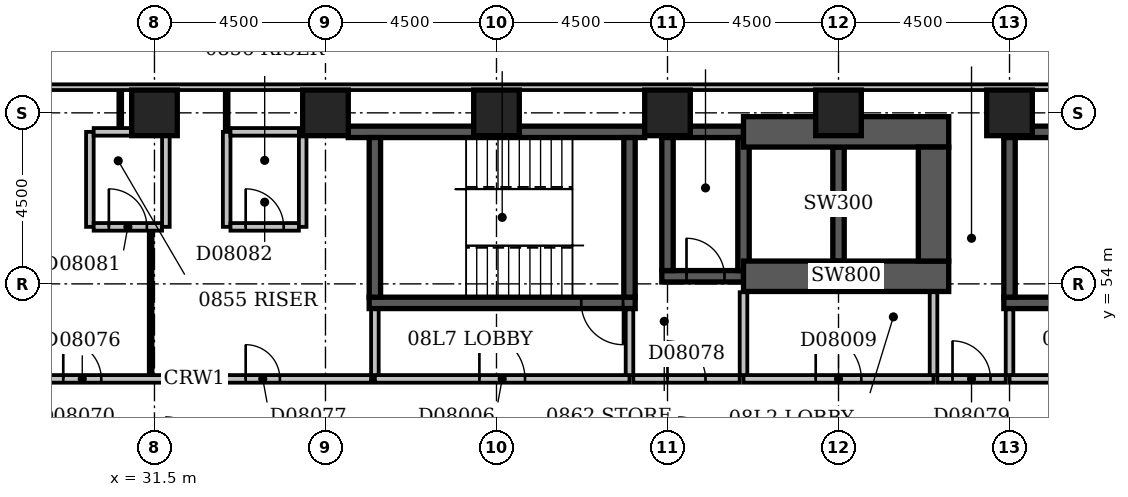
"""IFC4 building model, lengths in metres.
Left out: names, types, materials, properties, quantities, classifications, styles, units other than length and angle.
Written with IfcOpenShell. Run it as: python <this file> out.ifc"""

import sys

from ifc_helpers import new_model, si_unit, direction, frame, frame_2d, origin, origin_2d, place, context, subcontext, project, spatial, rectangle, extrude, element, fill, save


model = new_model("IFC4")
c1 = context("Model", 3, precision=1e-05, world=origin(), true_north=direction((0.0, 1.0)))
c2 = subcontext(c1, "Body", "Model", "MODEL_VIEW")
j1 = project(units=[si_unit("LENGTHUNIT", "METRE"), si_unit("PLANEANGLEUNIT", "RADIAN")], contexts=[c1])
p1 = place(None, origin())
s1 = spatial("IfcSite", under=j1, at=p1, CompositionType="ELEMENT")
p2 = place(p1, origin())
s2 = spatial("IfcBuilding", under=s1, at=p2, CompositionType="ELEMENT")
p3 = place(p2, frame((0.0, 0.0, 39.8)))
s3 = spatial("IfcBuildingStorey", under=s2, at=p3, CompositionType="ELEMENT", Elevation=39.8)
p4 = place(p3, frame((36.6, 58.0, -0.3), z_axis=(0.0, 0.0, 1.0), x_axis=(1.0, 0.0, 0.0)))
e1 = element("IfcWall", 1, at=p4, inside=s3, PredefinedType="SHEAR", context=c2, shape_type="SweptSolid", body=[
    extrude(rectangle(XDim=7.8, YDim=0.3, at=frame_2d((3.9, 0.0))), origin(), (0.0, 0.0, 1.0), 3.6),
])
p5 = place(p3, frame((37.15, 53.5, -0.3), z_axis=(0.0, 0.0, 1.0), x_axis=(1.0, 0.0, 0.0)))
e2 = element("IfcWall", 2, at=p5, inside=s3, PredefinedType="SHEAR", context=c2, shape_type="SweptSolid", body=[
    extrude(rectangle(XDim=7.0, YDim=0.3, at=frame_2d((3.5, 0.0))), origin(), (0.0, 0.0, 1.0), 3.6),
])
p6 = place(p5, frame((5.58, 0.0, 0.3)))
e3 = element("IfcOpeningElement", 3, at=p6, cuts=e2, PredefinedType="OPENING", context=c2, shape_type="SweptSolid", body=[
    extrude(rectangle(XDim=1.1, YDim=2.1, at=frame_2d((0.55, 1.05))), frame((0.0, 0.162, 0.0), z_axis=(0.0, -1.0, 0.0), x_axis=(1.0, 0.0, 0.0)), (0.0, 0.0, 1.0), 0.324),
])
for number, where, z_axis, x_axis in (
    (4, (37.3, 53.65, -0.3), (0.0, 0.0, 1.0), (0.0, 1.0, 0.0)),
    (5, (44.0, 53.65, -0.3), (0.0, 0.0, 1.0), (0.0, 1.0, 0.0)),
):
    element("IfcWall", number, at=place(p3, frame(where, z_axis=z_axis, x_axis=x_axis)), inside=s3, PredefinedType="SHEAR", context=c2, shape_type="SweptSolid", body=[
        extrude(rectangle(XDim=4.2, YDim=0.3, at=frame_2d((2.1, 0.0))), origin(), (0.0, 0.0, 1.0), 3.6),
    ])
p7 = place(p3, frame((44.85, 54.2, -0.3), z_axis=(0.0, 0.0, 1.0), x_axis=(1.0, 0.0, 0.0)))
e6 = element("IfcWall", 6, at=p7, inside=s3, PredefinedType="SHEAR", context=c2, shape_type="SweptSolid", body=[
    extrude(rectangle(XDim=2.15, YDim=0.3, at=frame_2d((1.075, 0.0))), origin(), (0.0, 0.0, 1.0), 3.6),
])
p8 = place(p7, frame((0.65, 0.0, 0.3)))
e7 = element("IfcOpeningElement", 7, at=p8, cuts=e6, PredefinedType="OPENING", context=c2, shape_type="SweptSolid", body=[
    extrude(rectangle(XDim=1.0, YDim=2.1, at=frame_2d((0.5, 1.05))), frame((0.0, 0.162, 0.0), z_axis=(0.0, -1.0, 0.0), x_axis=(1.0, 0.0, 0.0)), (0.0, 0.0, 1.0), 0.324),
])
p9 = place(p3, frame((44.85, 58.0, -0.3), z_axis=(0.0, 0.0, 1.0), x_axis=(1.0, 0.0, 0.0)))
e8 = element("IfcWall", 8, at=p9, inside=s3, PredefinedType="SHEAR", context=c2, shape_type="SweptSolid", body=[
    extrude(rectangle(XDim=2.15, YDim=0.3, at=frame_2d((1.075, 0.0))), origin(), (0.0, 0.0, 1.0), 3.6),
])
p10 = place(p3, frame((45.0, 54.35, -0.3), z_axis=(0.0, 0.0, 1.0), x_axis=(0.0, 1.0, 0.0)))
e9 = element("IfcWall", 9, at=p10, inside=s3, PredefinedType="SHEAR", context=c2, shape_type="SweptSolid", body=[
    extrude(rectangle(XDim=3.5, YDim=0.3, at=frame_2d((1.75, 0.0))), origin(), (0.0, 0.0, 1.0), 3.6),
])
p11 = place(p3, frame((47.0, 54.2, -0.3), z_axis=(0.0, 0.0, 1.0), x_axis=(1.0, 0.0, 0.0)))
e10 = element("IfcWall", 10, at=p11, inside=s3, PredefinedType="SHEAR", context=c2, shape_type="SweptSolid", body=[
    extrude(rectangle(XDim=5.4, YDim=0.8, at=frame_2d((2.7, 0.0))), origin(), (0.0, 0.0, 1.0), 3.6),
])
p12 = place(p3, frame((47.0, 54.35, -0.3), z_axis=(0.0, 0.0, 1.0), x_axis=(0.0, 1.0, 0.0)))
e11 = element("IfcWall", 11, at=p12, inside=s3, PredefinedType="SHEAR", context=c2, shape_type="SweptSolid", body=[
    extrude(rectangle(XDim=3.5, YDim=0.3, at=frame_2d((1.75, 0.0))), origin(), (0.0, 0.0, 1.0), 3.6),
])
p13 = place(p3, frame((47.0, 58.0, -0.3), z_axis=(0.0, 0.0, 1.0), x_axis=(1.0, 0.0, 0.0)))
e12 = element("IfcWall", 12, at=p13, inside=s3, PredefinedType="SHEAR", context=c2, shape_type="SweptSolid", body=[
    extrude(rectangle(XDim=5.4, YDim=0.8, at=frame_2d((2.7, 0.0))), origin(), (0.0, 0.0, 1.0), 3.6),
])
p14 = place(p3, frame((49.5, 54.6, -0.3), z_axis=(0.0, 0.0, 1.0), x_axis=(0.0, 1.0, 0.0)))
e13 = element("IfcWall", 13, at=p14, inside=s3, PredefinedType="SHEAR", context=c2, shape_type="SweptSolid", body=[
    extrude(rectangle(XDim=3.0, YDim=0.3, at=frame_2d((1.5, 0.0))), origin(), (0.0, 0.0, 1.0), 3.6),
])
p15 = place(p3, frame((52.0, 54.6, -0.3), z_axis=(0.0, 0.0, 1.0), x_axis=(0.0, 1.0, 0.0)))
e14 = element("IfcWall", 14, at=p15, inside=s3, PredefinedType="SHEAR", context=c2, shape_type="SweptSolid", body=[
    extrude(rectangle(XDim=3.0, YDim=0.8, at=frame_2d((1.5, 0.0))), origin(), (0.0, 0.0, 1.0), 3.6),
])
p16 = place(p3, frame((53.85, 53.5, -0.3), z_axis=(0.0, 0.0, 1.0), x_axis=(1.0, 0.0, 0.0)))
e15 = element("IfcWall", 15, at=p16, inside=s3, PredefinedType="SHEAR", context=c2, shape_type="SweptSolid", body=[
    extrude(rectangle(XDim=7.0, YDim=0.3, at=frame_2d((3.5, 0.0))), origin(), (0.0, 0.0, 1.0), 3.6),
])
p17 = place(p16, frame((5.58, 0.0, 0.3)))
e16 = element("IfcOpeningElement", 16, at=p17, cuts=e15, PredefinedType="OPENING", context=c2, shape_type="SweptSolid", body=[
    extrude(rectangle(XDim=1.1, YDim=2.1, at=frame_2d((0.55, 1.05))), frame((0.0, 0.162, 0.0), z_axis=(0.0, -1.0, 0.0), x_axis=(1.0, 0.0, 0.0)), (0.0, 0.0, 1.0), 0.324),
])
p18 = place(p3, frame((53.85, 58.0, -0.3), z_axis=(0.0, 0.0, 1.0), x_axis=(1.0, 0.0, 0.0)))
e17 = element("IfcWall", 17, at=p18, inside=s3, PredefinedType="SHEAR", context=c2, shape_type="SweptSolid", body=[
    extrude(rectangle(XDim=7.0, YDim=0.3, at=frame_2d((3.5, 0.0))), origin(), (0.0, 0.0, 1.0), 3.6),
])
p19 = place(p3, frame((54.0, 53.65, -0.3), z_axis=(0.0, 0.0, 1.0), x_axis=(0.0, 1.0, 0.0)))
e18 = element("IfcWall", 18, at=p19, inside=s3, PredefinedType="SHEAR", context=c2, shape_type="SweptSolid", body=[
    extrude(rectangle(XDim=4.2, YDim=0.3, at=frame_2d((2.1, 0.0))), origin(), (0.0, 0.0, 1.0), 3.6),
])
for number, where, z_axis, x_axis in (
    (19, (31.5, 58.5, -0.3), (0.0, 0.0, 1.0), (1.0, 0.0, 0.0)),
    (20, (36.0, 58.5, -0.3), (0.0, 0.0, 1.0), (1.0, 0.0, 0.0)),
    (21, (40.5, 58.5, -0.3), (0.0, 0.0, 1.0), (1.0, 0.0, 0.0)),
    (22, (45.0, 58.5, -0.3), (0.0, 0.0, 1.0), (1.0, 0.0, 0.0)),
    (23, (49.5, 58.5, -0.3), (0.0, 0.0, 1.0), (1.0, 0.0, 0.0)),
    (24, (54.0, 58.5, -0.3), (0.0, 0.0, 1.0), (1.0, 0.0, 0.0)),
):
    element("IfcColumn", number, at=place(p3, frame(where, z_axis=z_axis, x_axis=x_axis)), inside=s3, PredefinedType="COLUMN", context=c2, shape_type="SweptSolid", body=[
        extrude(rectangle(XDim=1.2, YDim=1.2, at=origin_2d()), origin(), (0.0, 0.0, 1.0), 3.6),
    ])
p20 = place(p3, frame((68.1, 59.175, 0.0), z_axis=(0.0, 0.0, 1.0), x_axis=(-1.0, 0.0, 0.0)))
e25 = element("IfcWall", 25, at=p20, inside=s3, PredefinedType="STANDARD", context=c2, shape_type="SweptSolid", body=[
    extrude(rectangle(XDim=68.85, YDim=0.15, at=frame_2d((34.425, 0.0))), origin(), (0.0, 0.0, 1.0), 2.7),
])
p21 = place(p20, frame((1.65, 0.0, 0.6)))
e26 = element("IfcOpeningElement", 26, at=p21, cuts=e25, PredefinedType="OPENING", context=c2, shape_type="SweptSolid", body=[
    extrude(rectangle(XDim=2.4, YDim=1.8, at=frame_2d((1.2, 0.9))), frame((0.0, 0.087, 0.0), z_axis=(0.0, -1.0, 0.0), x_axis=(1.0, 0.0, 0.0)), (0.0, 0.0, 1.0), 0.174),
])
p22 = place(p20, frame((7.17, 0.0, 0.6)))
e27 = element("IfcOpeningElement", 27, at=p22, cuts=e25, PredefinedType="OPENING", context=c2, shape_type="SweptSolid", body=[
    extrude(rectangle(XDim=1.5, YDim=1.8, at=frame_2d((0.75, 0.9))), frame((0.0, 0.087, 0.0), z_axis=(0.0, -1.0, 0.0), x_axis=(1.0, 0.0, 0.0)), (0.0, 0.0, 1.0), 0.174),
])
p23 = place(p3, frame((47.0, 51.5, 0.0), z_axis=(0.0, 0.0, 1.0), x_axis=(1.0, 0.0, 0.0)))
e28 = element("IfcWall", 28, at=p23, inside=s3, PredefinedType="PARTITIONING", context=c2, shape_type="SweptSolid", body=[
    extrude(rectangle(XDim=5.0, YDim=0.2, at=frame_2d((2.5, 0.0))), origin(), (0.0, 0.0, 1.0), 3.3),
])
p24 = place(p23, frame((1.9, 0.0, 0.0)))
e29 = element("IfcOpeningElement", 29, at=p24, cuts=e28, PredefinedType="OPENING", context=c2, shape_type="SweptSolid", body=[
    extrude(rectangle(XDim=1.2, YDim=2.1, at=frame_2d((0.6, 1.05))), frame((0.0, 0.112, 0.0), z_axis=(0.0, -1.0, 0.0), x_axis=(1.0, 0.0, 0.0)), (0.0, 0.0, 1.0), 0.224),
])
for number, where, z_axis, x_axis in (
    (30, (52.0, 51.6, 0.0), (0.0, 0.0, 1.0), (0.0, 1.0, 0.0)),
    (31, (47.0, 51.6, 0.0), (0.0, 0.0, 1.0), (0.0, 1.0, 0.0)),
):
    element("IfcWall", number, at=place(p3, frame(where, z_axis=z_axis, x_axis=x_axis)), inside=s3, PredefinedType="PARTITIONING", context=c2, shape_type="SweptSolid", body=[
        extrude(rectangle(XDim=2.18, YDim=0.2, at=frame_2d((1.09, 0.0))), origin(), (0.0, 0.0, 1.0), 3.3),
    ])
p25 = place(p3, frame((37.3, 51.5, 0.0), z_axis=(0.0, 0.0, 1.0), x_axis=(1.0, 0.0, 0.0)))
e32 = element("IfcWall", 32, at=p25, inside=s3, PredefinedType="PARTITIONING", context=c2, shape_type="SweptSolid", body=[
    extrude(rectangle(XDim=6.7, YDim=0.2, at=frame_2d((3.35, 0.0))), origin(), (0.0, 0.0, 1.0), 3.3),
])
p26 = place(p25, frame((2.75, 0.0, 0.0)))
e33 = element("IfcOpeningElement", 33, at=p26, cuts=e32, PredefinedType="OPENING", context=c2, shape_type="SweptSolid", body=[
    extrude(rectangle(XDim=1.2, YDim=2.1, at=frame_2d((0.6, 1.05))), frame((0.0, 0.112, 0.0), z_axis=(0.0, -1.0, 0.0), x_axis=(1.0, 0.0, 0.0)), (0.0, 0.0, 1.0), 0.224),
])
for number, where, z_axis, x_axis in (
    (34, (44.0, 51.6, 0.0), (0.0, 0.0, 1.0), (0.0, 1.0, 0.0)),
    (35, (37.3, 51.6, 0.0), (0.0, 0.0, 1.0), (0.0, 1.0, 0.0)),
):
    element("IfcWall", number, at=place(p3, frame(where, z_axis=z_axis, x_axis=x_axis)), inside=s3, PredefinedType="PARTITIONING", context=c2, shape_type="SweptSolid", body=[
        extrude(rectangle(XDim=1.73, YDim=0.2, at=frame_2d((0.865, 0.0))), origin(), (0.0, 0.0, 1.0), 3.3),
    ])
p27 = place(p3, frame((54.0, 51.5, 0.0), z_axis=(0.0, 0.0, 1.0), x_axis=(1.0, 0.0, 0.0)))
e36 = element("IfcWall", 36, at=p27, inside=s3, PredefinedType="PARTITIONING", context=c2, shape_type="SweptSolid", body=[
    extrude(rectangle(XDim=6.7, YDim=0.2, at=frame_2d((3.35, 0.0))), origin(), (0.0, 0.0, 1.0), 3.3),
])
p28 = place(p27, frame((2.75, 0.0, 0.0)))
e37 = element("IfcOpeningElement", 37, at=p28, cuts=e36, PredefinedType="OPENING", context=c2, shape_type="SweptSolid", body=[
    extrude(rectangle(XDim=1.2, YDim=2.1, at=frame_2d((0.6, 1.05))), frame((0.0, 0.112, 0.0), z_axis=(0.0, -1.0, 0.0), x_axis=(1.0, 0.0, 0.0)), (0.0, 0.0, 1.0), 0.224),
])
p29 = place(p3, frame((54.0, 51.6, 0.0), z_axis=(0.0, 0.0, 1.0), x_axis=(0.0, 1.0, 0.0)))
e38 = element("IfcWall", 38, at=p29, inside=s3, PredefinedType="PARTITIONING", context=c2, shape_type="SweptSolid", body=[
    extrude(rectangle(XDim=1.73, YDim=0.2, at=frame_2d((0.865, 0.0))), origin(), (0.0, 0.0, 1.0), 2.6),
])
p30 = place(p3, frame((27.9, 51.5, 0.0), z_axis=(0.0, 0.0, 1.0), x_axis=(1.0, 0.0, 0.0)))
e39 = element("IfcWall", 39, at=p30, inside=s3, PredefinedType="PARTITIONING", context=c2, shape_type="SweptSolid", body=[
    extrude(rectangle(XDim=9.3, YDim=0.2, at=frame_2d((4.65, 0.0))), origin(), (0.0, 0.0, 1.0), 3.3),
])
p31 = place(p30, frame((1.2, 0.0, 0.0)))
e40 = element("IfcOpeningElement", 40, at=p31, cuts=e39, PredefinedType="OPENING", context=c2, shape_type="SweptSolid", body=[
    extrude(rectangle(XDim=1.0, YDim=2.1, at=frame_2d((0.5, 1.05))), frame((0.0, 0.112, 0.0), z_axis=(0.0, -1.0, 0.0), x_axis=(1.0, 0.0, 0.0)), (0.0, 0.0, 1.0), 0.224),
])
p32 = place(p30, frame((6.0, 0.0, 0.0)))
e41 = element("IfcOpeningElement", 41, at=p32, cuts=e39, PredefinedType="OPENING", context=c2, shape_type="SweptSolid", body=[
    extrude(rectangle(XDim=0.9, YDim=2.1, at=frame_2d((0.45, 1.05))), frame((0.0, 0.112, 0.0), z_axis=(0.0, -1.0, 0.0), x_axis=(1.0, 0.0, 0.0)), (0.0, 0.0, 1.0), 0.224),
])
p33 = place(p3, frame((44.1, 51.5, 0.0), z_axis=(0.0, 0.0, 1.0), x_axis=(1.0, 0.0, 0.0)))
e42 = element("IfcWall", 42, at=p33, inside=s3, PredefinedType="PARTITIONING", context=c2, shape_type="SweptSolid", body=[
    extrude(rectangle(XDim=2.8, YDim=0.2, at=frame_2d((1.4, 0.0))), origin(), (0.0, 0.0, 1.0), 3.3),
])
p34 = place(p33, frame((0.9, 0.0, 0.0)))
e43 = element("IfcOpeningElement", 43, at=p34, cuts=e42, PredefinedType="OPENING", context=c2, shape_type="SweptSolid", body=[
    extrude(rectangle(XDim=1.0, YDim=2.1, at=frame_2d((0.5, 1.05))), frame((0.0, 0.112, 0.0), z_axis=(0.0, -1.0, 0.0), x_axis=(1.0, 0.0, 0.0)), (0.0, 0.0, 1.0), 0.224),
])
p35 = place(p3, frame((52.1, 51.5, 0.0), z_axis=(0.0, 0.0, 1.0), x_axis=(1.0, 0.0, 0.0)))
e44 = element("IfcWall", 44, at=p35, inside=s3, PredefinedType="PARTITIONING", context=c2, shape_type="SweptSolid", body=[
    extrude(rectangle(XDim=1.8, YDim=0.2, at=frame_2d((0.9, 0.0))), origin(), (0.0, 0.0, 1.0), 3.3),
])
p36 = place(p35, frame((0.4, 0.0, 0.0)))
e45 = element("IfcOpeningElement", 45, at=p36, cuts=e44, PredefinedType="OPENING", context=c2, shape_type="SweptSolid", body=[
    extrude(rectangle(XDim=1.0, YDim=2.1, at=frame_2d((0.5, 1.05))), frame((0.0, 0.112, 0.0), z_axis=(0.0, -1.0, 0.0), x_axis=(1.0, 0.0, 0.0)), (0.0, 0.0, 1.0), 0.224),
])
p37 = place(p3, frame((31.4, 51.6, 0.0), z_axis=(0.0, 0.0, 1.0), x_axis=(0.0, 1.0, 0.0)))
e46 = element("IfcWall", 46, at=p37, inside=s3, PredefinedType="PARTITIONING", context=c2, shape_type="SweptSolid", body=[
    extrude(rectangle(XDim=3.8, YDim=0.1, at=frame_2d((1.9, 0.0))), origin(), (0.0, 0.0, 1.0), 3.3),
])
p38 = place(p3, frame((29.8, 55.5, 0.0), z_axis=(0.0, 0.0, 1.0), x_axis=(0.0, 1.0, 0.0)))
e47 = element("IfcWall", 47, at=p38, inside=s3, PredefinedType="PARTITIONING", context=c2, shape_type="SweptSolid", body=[
    extrude(rectangle(XDim=2.5, YDim=0.2, at=frame_2d((1.25, 0.0))), origin(), (0.0, 0.0, 1.0), 3.3),
])
p39 = place(p3, frame((29.9, 55.5, 0.0), z_axis=(0.0, 0.0, 1.0), x_axis=(1.0, 0.0, 0.0)))
e48 = element("IfcWall", 48, at=p39, inside=s3, PredefinedType="PARTITIONING", context=c2, shape_type="SweptSolid", body=[
    extrude(rectangle(XDim=1.8, YDim=0.2, at=frame_2d((0.9, 0.0))), origin(), (0.0, 0.0, 1.0), 3.3),
])
p40 = place(p39, frame((0.4, 0.0, 0.0)))
e49 = element("IfcOpeningElement", 49, at=p40, cuts=e48, PredefinedType="OPENING", context=c2, shape_type="SweptSolid", body=[
    extrude(rectangle(XDim=1.0, YDim=2.1, at=frame_2d((0.5, 1.05))), frame((0.0, 0.112, 0.0), z_axis=(0.0, -1.0, 0.0), x_axis=(1.0, 0.0, 0.0)), (0.0, 0.0, 1.0), 0.224),
])
for number, where, z_axis, x_axis in (
    (50, (31.8, 55.5, 0.0), (0.0, 0.0, 1.0), (0.0, 1.0, 0.0)),
    (51, (33.4, 55.5, 0.0), (0.0, 0.0, 1.0), (0.0, 1.0, 0.0)),
):
    element("IfcWall", number, at=place(p3, frame(where, z_axis=z_axis, x_axis=x_axis)), inside=s3, PredefinedType="PARTITIONING", context=c2, shape_type="SweptSolid", body=[
        extrude(rectangle(XDim=2.5, YDim=0.2, at=frame_2d((1.25, 0.0))), origin(), (0.0, 0.0, 1.0), 3.3),
    ])
p41 = place(p3, frame((33.5, 55.5, 0.0), z_axis=(0.0, 0.0, 1.0), x_axis=(1.0, 0.0, 0.0)))
e52 = element("IfcWall", 52, at=p41, inside=s3, PredefinedType="PARTITIONING", context=c2, shape_type="SweptSolid", body=[
    extrude(rectangle(XDim=1.8, YDim=0.2, at=frame_2d((0.9, 0.0))), origin(), (0.0, 0.0, 1.0), 3.3),
])
p42 = place(p41, frame((0.4, 0.0, 0.0)))
e53 = element("IfcOpeningElement", 53, at=p42, cuts=e52, PredefinedType="OPENING", context=c2, shape_type="SweptSolid", body=[
    extrude(rectangle(XDim=1.0, YDim=2.1, at=frame_2d((0.5, 1.05))), frame((0.0, 0.112, 0.0), z_axis=(0.0, -1.0, 0.0), x_axis=(1.0, 0.0, 0.0)), (0.0, 0.0, 1.0), 0.224),
])
p43 = place(p3, frame((35.4, 55.5, 0.0), z_axis=(0.0, 0.0, 1.0), x_axis=(0.0, 1.0, 0.0)))
e54 = element("IfcWall", 54, at=p43, inside=s3, PredefinedType="PARTITIONING", context=c2, shape_type="SweptSolid", body=[
    extrude(rectangle(XDim=2.5, YDim=0.2, at=frame_2d((1.25, 0.0))), origin(), (0.0, 0.0, 1.0), 2.4),
])
p44 = place(p3, frame((29.9, 58.0, 0.0), z_axis=(0.0, 0.0, 1.0), x_axis=(1.0, 0.0, 0.0)))
e55 = element("IfcWall", 55, at=p44, inside=s3, PredefinedType="PARTITIONING", context=c2, shape_type="SweptSolid", body=[
    extrude(rectangle(XDim=1.8, YDim=0.2, at=frame_2d((0.9, 0.0))), origin(), (0.0, 0.0, 1.0), 3.3),
])
p45 = place(p3, frame((33.4, 58.0, 0.0), z_axis=(0.0, 0.0, 1.0), x_axis=(0.0, 1.0, 0.0)))
e56 = element("IfcWall", 56, at=p45, inside=s3, PredefinedType="PARTITIONING", context=c2, shape_type="SweptSolid", body=[
    extrude(rectangle(XDim=1.1, YDim=0.1, at=frame_2d((0.55, 0.0))), origin(), (0.0, 0.0, 1.0), 3.3),
])
p46 = place(p3, frame((33.5, 58.0, 0.0), z_axis=(0.0, 0.0, 1.0), x_axis=(1.0, 0.0, 0.0)))
e57 = element("IfcWall", 57, at=p46, inside=s3, PredefinedType="PARTITIONING", context=c2, shape_type="SweptSolid", body=[
    extrude(rectangle(XDim=1.8, YDim=0.2, at=frame_2d((0.9, 0.0))), origin(), (0.0, 0.0, 1.0), 3.3),
])
p47 = place(p3, frame((30.6, 58.1, 0.0), z_axis=(0.0, 0.0, 1.0), x_axis=(0.0, 1.0, 0.0)))
e58 = element("IfcWall", 58, at=p47, inside=s3, PredefinedType="PARTITIONING", context=c2, shape_type="SweptSolid", body=[
    extrude(rectangle(XDim=1.0, YDim=0.1, at=frame_2d((0.5, 0.0))), origin(), (0.0, 0.0, 1.0), 3.3),
])
p48 = place(p26, origin())
e59 = element("IfcDoor", 59, at=p48, inside=s3, OperationType="SINGLE_SWING_LEFT", PredefinedType="DOOR", context=c2, shape_type="SweptSolid", body=[
    extrude(rectangle(XDim=1.2, YDim=2.1, at=frame_2d((0.6, 1.05))), frame((0.0, 0.025, 0.0), z_axis=(0.0, -1.0, 0.0), x_axis=(1.0, 0.0, 0.0)), (0.0, 0.0, 1.0), 0.05),
])
fill(e33, e59)
p49 = place(p24, origin())
e60 = element("IfcDoor", 60, at=p49, inside=s3, OperationType="SINGLE_SWING_LEFT", PredefinedType="DOOR", context=c2, shape_type="SweptSolid", body=[
    extrude(rectangle(XDim=1.2, YDim=2.1, at=frame_2d((0.6, 1.05))), frame((0.0, 0.025, 0.0), z_axis=(0.0, -1.0, 0.0), x_axis=(1.0, 0.0, 0.0)), (0.0, 0.0, 1.0), 0.05),
])
fill(e29, e60)
p50 = place(p8, origin())
e61 = element("IfcDoor", 61, at=p50, inside=s3, OperationType="SINGLE_SWING_LEFT", PredefinedType="DOOR", context=c2, shape_type="SweptSolid", body=[
    extrude(rectangle(XDim=1.0, YDim=2.1, at=frame_2d((0.5, 1.05))), frame((0.0, 0.025, 0.0), z_axis=(0.0, -1.0, 0.0), x_axis=(1.0, 0.0, 0.0)), (0.0, 0.0, 1.0), 0.05),
])
fill(e7, e61)
p51 = place(p6, origin())
e62 = element("IfcDoor", 62, at=p51, inside=s3, OperationType="SINGLE_SWING_RIGHT", PredefinedType="DOOR", context=c2, shape_type="SweptSolid", body=[
    extrude(rectangle(XDim=1.1, YDim=2.1, at=frame_2d((0.55, 1.05))), frame((0.0, 0.025, 0.0), z_axis=(0.0, -1.0, 0.0), x_axis=(1.0, 0.0, 0.0)), (0.0, 0.0, 1.0), 0.05),
])
fill(e3, e62)
p52 = place(p31, origin())
e63 = element("IfcDoor", 63, at=p52, inside=s3, OperationType="SINGLE_SWING_LEFT", PredefinedType="DOOR", context=c2, shape_type="SweptSolid", body=[
    extrude(rectangle(XDim=1.0, YDim=2.1, at=frame_2d((0.5, 1.05))), frame((0.0, 0.025, 0.0), z_axis=(0.0, -1.0, 0.0), x_axis=(1.0, 0.0, 0.0)), (0.0, 0.0, 1.0), 0.05),
])
fill(e40, e63)
p53 = place(p32, origin())
e64 = element("IfcDoor", 64, at=p53, inside=s3, OperationType="SINGLE_SWING_LEFT", PredefinedType="DOOR", context=c2, shape_type="SweptSolid", body=[
    extrude(rectangle(XDim=0.9, YDim=2.1, at=frame_2d((0.45, 1.05))), frame((0.0, 0.025, 0.0), z_axis=(0.0, -1.0, 0.0), x_axis=(1.0, 0.0, 0.0)), (0.0, 0.0, 1.0), 0.05),
])
fill(e41, e64)
p54 = place(p34, origin())
e65 = element("IfcDoor", 65, at=p54, inside=s3, OperationType="SINGLE_SWING_LEFT", PredefinedType="DOOR", context=c2, shape_type="SweptSolid", body=[
    extrude(rectangle(XDim=1.0, YDim=2.1, at=frame_2d((0.5, 1.05))), frame((0.0, 0.025, 0.0), z_axis=(0.0, -1.0, 0.0), x_axis=(1.0, 0.0, 0.0)), (0.0, 0.0, 1.0), 0.05),
])
fill(e43, e65)
p55 = place(p36, origin())
e66 = element("IfcDoor", 66, at=p55, inside=s3, OperationType="SINGLE_SWING_LEFT", PredefinedType="DOOR", context=c2, shape_type="SweptSolid", body=[
    extrude(rectangle(XDim=1.0, YDim=2.1, at=frame_2d((0.5, 1.05))), frame((0.0, 0.025, 0.0), z_axis=(0.0, -1.0, 0.0), x_axis=(1.0, 0.0, 0.0)), (0.0, 0.0, 1.0), 0.05),
])
fill(e45, e66)
p56 = place(p40, origin())
e67 = element("IfcDoor", 67, at=p56, inside=s3, OperationType="SINGLE_SWING_LEFT", PredefinedType="DOOR", context=c2, shape_type="SweptSolid", body=[
    extrude(rectangle(XDim=1.0, YDim=2.1, at=frame_2d((0.5, 1.05))), frame((0.0, 0.025, 0.0), z_axis=(0.0, -1.0, 0.0), x_axis=(1.0, 0.0, 0.0)), (0.0, 0.0, 1.0), 0.05),
])
fill(e49, e67)
p57 = place(p42, origin())
e68 = element("IfcDoor", 68, at=p57, inside=s3, OperationType="SINGLE_SWING_LEFT", PredefinedType="DOOR", context=c2, shape_type="SweptSolid", body=[
    extrude(rectangle(XDim=1.0, YDim=2.1, at=frame_2d((0.5, 1.05))), frame((0.0, 0.025, 0.0), z_axis=(0.0, -1.0, 0.0), x_axis=(1.0, 0.0, 0.0)), (0.0, 0.0, 1.0), 0.05),
])
fill(e53, e68)
save(model, sys.argv[1])
